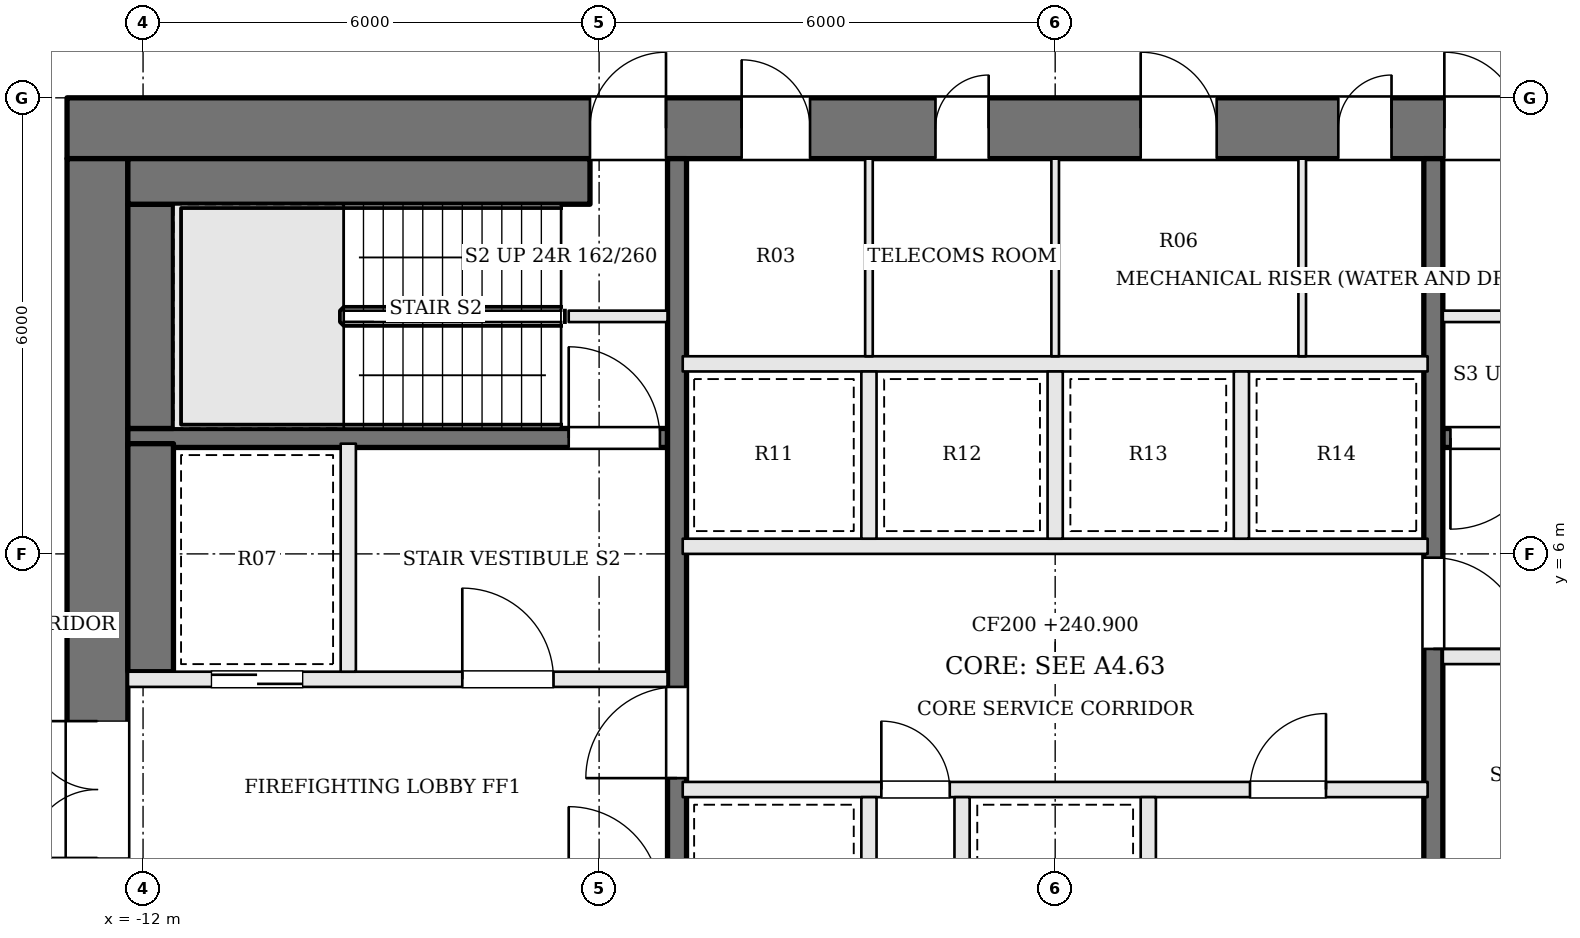
"""IFC4 building model, lengths in metres.
Left out: names, types, materials, properties, quantities, classifications, styles, units other than length and angle.
Written with IfcOpenShell. Run it as: python <this file> out.ifc"""

import sys

from ifc_helpers import new_model, si_unit, direction, frame, frame_2d, origin, place, context, subcontext, project, spatial, rectangle, extrude, element, fill, save


model = new_model("IFC4")
c1 = context("Model", 3, precision=1e-05, world=origin(), true_north=direction((0.0, 1.0)))
c2 = subcontext(c1, "Body", "Model", "MODEL_VIEW")
j1 = project(units=[si_unit("LENGTHUNIT", "METRE"), si_unit("PLANEANGLEUNIT", "RADIAN")], contexts=[c1])
p1 = place(None, origin())
s1 = spatial("IfcSite", under=j1, at=p1, CompositionType="ELEMENT")
p2 = place(p1, origin())
s2 = spatial("IfcBuilding", under=s1, at=p2, CompositionType="ELEMENT")
p3 = place(p2, frame((0.0, 0.0, 240.9)))
s3 = spatial("IfcBuildingStorey", under=s2, at=p3, CompositionType="ELEMENT", Elevation=240.9)
p4 = place(p3, frame((-13.0, 11.6, 0.0), z_axis=(0.0, 0.0, 1.0), x_axis=(1.0, 0.0, 0.0)))
e1 = element("IfcWall", 1, at=p4, inside=s3, PredefinedType="SHEAR", context=c2, shape_type="SweptSolid", body=[
    extrude(rectangle(XDim=26.0, YDim=0.8, at=frame_2d((13.0, 0.0))), origin(), (0.0, 0.0, 1.0), 3.9),
])
p5 = place(p4, frame((8.875, 0.0, 0.0)))
e2 = element("IfcOpeningElement", 2, at=p5, cuts=e1, PredefinedType="OPENING", context=c2, shape_type="SweptSolid", body=[
    extrude(rectangle(XDim=0.9, YDim=2.1, at=frame_2d((0.45, 1.05))), frame((0.0, 0.41, 0.0), z_axis=(0.0, -1.0, 0.0), x_axis=(1.0, 0.0, 0.0)), (0.0, 0.0, 1.0), 0.82),
])
p6 = place(p4, frame((11.425, 0.0, 0.0)))
e3 = element("IfcOpeningElement", 3, at=p6, cuts=e1, PredefinedType="OPENING", context=c2, shape_type="SweptSolid", body=[
    extrude(rectangle(XDim=0.7, YDim=2.1, at=frame_2d((0.35, 1.05))), frame((0.0, 0.41, 0.0), z_axis=(0.0, -1.0, 0.0), x_axis=(1.0, 0.0, 0.0)), (0.0, 0.0, 1.0), 0.82),
])
p7 = place(p4, frame((14.125, 0.0, 0.0)))
e4 = element("IfcOpeningElement", 4, at=p7, cuts=e1, PredefinedType="OPENING", context=c2, shape_type="SweptSolid", body=[
    extrude(rectangle(XDim=1.0, YDim=2.1, at=frame_2d((0.5, 1.05))), frame((0.0, 0.41, 0.0), z_axis=(0.0, -1.0, 0.0), x_axis=(1.0, 0.0, 0.0)), (0.0, 0.0, 1.0), 0.82),
])
p8 = place(p4, frame((16.725, 0.0, 0.0)))
e5 = element("IfcOpeningElement", 5, at=p8, cuts=e1, PredefinedType="OPENING", context=c2, shape_type="SweptSolid", body=[
    extrude(rectangle(XDim=0.7, YDim=2.1, at=frame_2d((0.35, 1.05))), frame((0.0, 0.41, 0.0), z_axis=(0.0, -1.0, 0.0), x_axis=(1.0, 0.0, 0.0)), (0.0, 0.0, 1.0), 0.82),
])
p9 = place(p4, frame((6.88, 0.0, 0.0)))
e6 = element("IfcOpeningElement", 6, at=p9, cuts=e1, PredefinedType="OPENING", context=c2, shape_type="SweptSolid", body=[
    extrude(rectangle(XDim=1.0, YDim=2.1, at=frame_2d((0.5, 1.05))), frame((0.0, 0.41, 0.0), z_axis=(0.0, -1.0, 0.0), x_axis=(1.0, 0.0, 0.0)), (0.0, 0.0, 1.0), 0.82),
])
p10 = place(p4, frame((18.12, 0.0, 0.0)))
e7 = element("IfcOpeningElement", 7, at=p10, cuts=e1, PredefinedType="OPENING", context=c2, shape_type="SweptSolid", body=[
    extrude(rectangle(XDim=1.0, YDim=2.1, at=frame_2d((0.5, 1.05))), frame((0.0, 0.41, 0.0), z_axis=(0.0, -1.0, 0.0), x_axis=(1.0, 0.0, 0.0)), (0.0, 0.0, 1.0), 0.82),
])
p11 = place(p3, frame((-12.6, -2.2, 0.0), z_axis=(0.0, 0.0, 1.0), x_axis=(0.0, 1.0, 0.0)))
e8 = element("IfcWall", 8, at=p11, inside=s3, PredefinedType="SHEAR", context=c2, shape_type="SweptSolid", body=[
    extrude(rectangle(XDim=13.4, YDim=0.8, at=frame_2d((6.7, 0.0))), origin(), (0.0, 0.0, 1.0), 3.9),
])
p12 = place(p11, frame((4.2, 0.0, 0.0)))
e9 = element("IfcOpeningElement", 9, at=p12, cuts=e8, PredefinedType="OPENING", context=c2, shape_type="SweptSolid", body=[
    extrude(rectangle(XDim=1.8, YDim=2.1, at=frame_2d((0.9, 1.05))), frame((0.0, 0.41, 0.0), z_axis=(0.0, -1.0, 0.0), x_axis=(1.0, 0.0, 0.0)), (0.0, 0.0, 1.0), 0.82),
])
for number, where, z_axis, x_axis in (
    (10, (6.4, 9.125, 0.0), (0.0, 0.0, 1.0), (-1.0, 0.0, 0.0)),
    (11, (-6.4, 9.125, 0.0), (0.0, 0.0, 1.0), (1.0, 0.0, 0.0)),
):
    element("IfcWall", number, at=place(p3, frame(where, z_axis=z_axis, x_axis=x_axis)), inside=s3, PredefinedType="SOLIDWALL", context=c2, shape_type="SweptSolid", body=[
        extrude(rectangle(XDim=1.3, YDim=0.15, at=frame_2d((0.65, 0.0))), origin(), (0.0, 0.0, 1.0), 3.7),
    ])
p13 = place(p3, frame((12.2, 7.525, 0.0), z_axis=(0.0, 0.0, 1.0), x_axis=(-1.0, 0.0, 0.0)))
e12 = element("IfcWall", 12, at=p13, inside=s3, PredefinedType="SOLIDWALL", context=c2, shape_type="SweptSolid", body=[
    extrude(rectangle(XDim=7.1, YDim=0.25, at=frame_2d((3.55, 0.0))), origin(), (0.0, 0.0, 1.0), 3.7),
])
p14 = place(p13, frame((5.8, 0.0, 0.0)))
e13 = element("IfcOpeningElement", 13, at=p14, cuts=e12, PredefinedType="OPENING", context=c2, shape_type="SweptSolid", body=[
    extrude(rectangle(XDim=1.2, YDim=2.1, at=frame_2d((0.6, 1.05))), frame((0.0, 0.135, 0.0), z_axis=(0.0, -1.0, 0.0), x_axis=(1.0, 0.0, 0.0)), (0.0, 0.0, 1.0), 0.27),
])
p15 = place(p3, frame((-12.2, 4.35, 0.0), z_axis=(0.0, 0.0, 1.0), x_axis=(1.0, 0.0, 0.0)))
e14 = element("IfcWall", 14, at=p15, inside=s3, PredefinedType="SOLIDWALL", context=c2, shape_type="SweptSolid", body=[
    extrude(rectangle(XDim=7.1, YDim=0.2, at=frame_2d((3.55, 0.0))), origin(), (0.0, 0.0, 1.0), 3.7),
])
p16 = place(p15, frame((4.4, 0.0, 0.0)))
e15 = element("IfcOpeningElement", 15, at=p16, cuts=e14, PredefinedType="OPENING", context=c2, shape_type="SweptSolid", body=[
    extrude(rectangle(XDim=1.2, YDim=2.1, at=frame_2d((0.6, 1.05))), frame((0.0, 0.11, 0.0), z_axis=(0.0, -1.0, 0.0), x_axis=(1.0, 0.0, 0.0)), (0.0, 0.0, 1.0), 0.22),
])
p17 = place(p15, frame((1.1, 0.0, 0.0)))
e16 = element("IfcOpeningElement", 16, at=p17, cuts=e14, PredefinedType="OPENING", context=c2, shape_type="SweptSolid", body=[
    extrude(rectangle(XDim=1.2, YDim=2.1, at=frame_2d((0.6, 1.05))), frame((0.0, 0.11, 0.0), z_axis=(0.0, -1.0, 0.0), x_axis=(1.0, 0.0, 0.0)), (0.0, 0.0, 1.0), 0.22),
])
p18 = place(p3, frame((12.2, 4.65, 0.0), z_axis=(0.0, 0.0, 1.0), x_axis=(-1.0, 0.0, 0.0)))
e17 = element("IfcWall", 17, at=p18, inside=s3, PredefinedType="SOLIDWALL", context=c2, shape_type="SweptSolid", body=[
    extrude(rectangle(XDim=7.1, YDim=0.2, at=frame_2d((3.55, 0.0))), origin(), (0.0, 0.0, 1.0), 3.7),
])
p19 = place(p18, frame((4.4, 0.0, 0.0)))
e18 = element("IfcOpeningElement", 18, at=p19, cuts=e17, PredefinedType="OPENING", context=c2, shape_type="SweptSolid", body=[
    extrude(rectangle(XDim=1.2, YDim=2.1, at=frame_2d((0.6, 1.05))), frame((0.0, 0.11, 0.0), z_axis=(0.0, -1.0, 0.0), x_axis=(1.0, 0.0, 0.0)), (0.0, 0.0, 1.0), 0.22),
])
p20 = place(p18, frame((1.1, 0.0, 0.0)))
e19 = element("IfcOpeningElement", 19, at=p20, cuts=e17, PredefinedType="OPENING", context=c2, shape_type="SweptSolid", body=[
    extrude(rectangle(XDim=1.2, YDim=2.1, at=frame_2d((0.6, 1.05))), frame((0.0, 0.11, 0.0), z_axis=(0.0, -1.0, 0.0), x_axis=(1.0, 0.0, 0.0)), (0.0, 0.0, 1.0), 0.22),
])
p21 = place(p3, frame((-12.2, 7.525, 0.0), z_axis=(0.0, 0.0, 1.0), x_axis=(1.0, 0.0, 0.0)))
e20 = element("IfcWall", 20, at=p21, inside=s3, PredefinedType="SOLIDWALL", context=c2, shape_type="SweptSolid", body=[
    extrude(rectangle(XDim=7.1, YDim=0.25, at=frame_2d((3.55, 0.0))), origin(), (0.0, 0.0, 1.0), 3.7),
])
p22 = place(p21, frame((5.8, 0.0, 0.0)))
e21 = element("IfcOpeningElement", 21, at=p22, cuts=e20, PredefinedType="OPENING", context=c2, shape_type="SweptSolid", body=[
    extrude(rectangle(XDim=1.2, YDim=2.1, at=frame_2d((0.6, 1.05))), frame((0.0, 0.135, 0.0), z_axis=(0.0, -1.0, 0.0), x_axis=(1.0, 0.0, 0.0)), (0.0, 0.0, 1.0), 0.27),
])
p23 = place(p3, frame((-9.3, 4.45, 0.0), z_axis=(0.0, 0.0, 1.0), x_axis=(0.0, 1.0, 0.0)))
e22 = element("IfcWall", 22, at=p23, inside=s3, PredefinedType="SOLIDWALL", context=c2, shape_type="SweptSolid", body=[
    extrude(rectangle(XDim=3.0, YDim=0.2, at=frame_2d((1.5, 0.0))), origin(), (0.0, 0.0, 1.0), 3.7),
])
p24 = place(p3, frame((-4.975, -2.2, 0.0), z_axis=(0.0, 0.0, 1.0), x_axis=(0.0, 1.0, 0.0)))
e23 = element("IfcWall", 23, at=p24, inside=s3, PredefinedType="SOLIDWALL", context=c2, shape_type="SweptSolid", body=[
    extrude(rectangle(XDim=13.4, YDim=0.25, at=frame_2d((6.7, 0.0))), origin(), (0.0, 0.0, 1.0), 3.7),
])
p25 = place(p24, frame((5.25, 0.0, 0.0)))
e24 = element("IfcOpeningElement", 24, at=p25, cuts=e23, PredefinedType="OPENING", context=c2, shape_type="SweptSolid", body=[
    extrude(rectangle(XDim=1.2, YDim=2.1, at=frame_2d((0.6, 1.05))), frame((0.0, 0.135, 0.0), z_axis=(0.0, -1.0, 0.0), x_axis=(1.0, 0.0, 0.0)), (0.0, 0.0, 1.0), 0.27),
])
p26 = place(p3, frame((4.975, 11.2, 0.0), z_axis=(0.0, 0.0, 1.0), x_axis=(0.0, -1.0, 0.0)))
e25 = element("IfcWall", 25, at=p26, inside=s3, PredefinedType="SOLIDWALL", context=c2, shape_type="SweptSolid", body=[
    extrude(rectangle(XDim=13.4, YDim=0.25, at=frame_2d((6.7, 0.0))), origin(), (0.0, 0.0, 1.0), 3.7),
])
p27 = place(p26, frame((5.25, 0.0, 0.0)))
e26 = element("IfcOpeningElement", 26, at=p27, cuts=e25, PredefinedType="OPENING", context=c2, shape_type="SweptSolid", body=[
    extrude(rectangle(XDim=1.2, YDim=2.1, at=frame_2d((0.6, 1.05))), frame((0.0, 0.135, 0.0), z_axis=(0.0, -1.0, 0.0), x_axis=(1.0, 0.0, 0.0)), (0.0, 0.0, 1.0), 0.27),
])
p28 = place(p3, frame((-11.9, 4.45, 0.0), z_axis=(0.0, 0.0, 1.0), x_axis=(0.0, 1.0, 0.0)))
e27 = element("IfcWall", 27, at=p28, inside=s3, PredefinedType="SOLIDWALL", context=c2, shape_type="SweptSolid", body=[
    extrude(rectangle(XDim=3.0, YDim=0.6, at=frame_2d((1.5, 0.0))), origin(), (0.0, 0.0, 1.0), 3.7),
])
p29 = place(p3, frame((-11.9, 7.65, 0.0), z_axis=(0.0, 0.0, 1.0), x_axis=(0.0, 1.0, 0.0)))
e28 = element("IfcWall", 28, at=p29, inside=s3, PredefinedType="SOLIDWALL", context=c2, shape_type="SweptSolid", body=[
    extrude(rectangle(XDim=2.95, YDim=0.6, at=frame_2d((1.475, 0.0))), origin(), (0.0, 0.0, 1.0), 3.7),
])
p30 = place(p3, frame((-12.2, 10.9, 0.0), z_axis=(0.0, 0.0, 1.0), x_axis=(1.0, 0.0, 0.0)))
e29 = element("IfcWall", 29, at=p30, inside=s3, PredefinedType="SOLIDWALL", context=c2, shape_type="SweptSolid", body=[
    extrude(rectangle(XDim=6.08, YDim=0.6, at=frame_2d((3.04, 0.0))), origin(), (0.0, 0.0, 1.0), 3.7),
])
p31 = place(p3, frame((-4.9, 2.9, 0.0), z_axis=(0.0, 0.0, 1.0), x_axis=(1.0, 0.0, 0.0)))
e30 = element("IfcWall", 30, at=p31, inside=s3, PredefinedType="SOLIDWALL", context=c2, shape_type="SweptSolid", body=[
    extrude(rectangle(XDim=9.8, YDim=0.2, at=frame_2d((4.9, 0.0))), origin(), (0.0, 0.0, 1.0), 3.7),
])
p32 = place(p31, frame((2.613, 0.0, 0.0)))
e31 = element("IfcOpeningElement", 31, at=p32, cuts=e30, PredefinedType="OPENING", context=c2, shape_type="SweptSolid", body=[
    extrude(rectangle(XDim=0.9, YDim=2.1, at=frame_2d((0.45, 1.05))), frame((0.0, 0.11, 0.0), z_axis=(0.0, -1.0, 0.0), x_axis=(1.0, 0.0, 0.0)), (0.0, 0.0, 1.0), 0.22),
])
p33 = place(p31, frame((7.463, 0.0, 0.0)))
e32 = element("IfcOpeningElement", 32, at=p33, cuts=e30, PredefinedType="OPENING", context=c2, shape_type="SweptSolid", body=[
    extrude(rectangle(XDim=1.0, YDim=2.1, at=frame_2d((0.5, 1.05))), frame((0.0, 0.11, 0.0), z_axis=(0.0, -1.0, 0.0), x_axis=(1.0, 0.0, 0.0)), (0.0, 0.0, 1.0), 0.22),
])
for number, where, z_axis, x_axis in (
    (33, (-4.9, 6.1, 0.0), (0.0, 0.0, 1.0), (1.0, 0.0, 0.0)),
    (34, (-4.9, 8.5, 0.0), (0.0, 0.0, 1.0), (1.0, 0.0, 0.0)),
):
    element("IfcWall", number, at=place(p3, frame(where, z_axis=z_axis, x_axis=x_axis)), inside=s3, PredefinedType="SOLIDWALL", context=c2, shape_type="SweptSolid", body=[
        extrude(rectangle(XDim=9.8, YDim=0.2, at=frame_2d((4.9, 0.0))), origin(), (0.0, 0.0, 1.0), 3.7),
    ])
for number, where, z_axis, x_axis in (
    (35, (-2.45, 0.6, 0.0), (0.0, 0.0, 1.0), (0.0, 1.0, 0.0)),
    (36, (-1.225, 0.6, 0.0), (0.0, 0.0, 1.0), (0.0, 1.0, 0.0)),
    (37, (1.225, 0.6, 0.0), (0.0, 0.0, 1.0), (0.0, 1.0, 0.0)),
    (38, (-2.45, 6.2, 0.0), (0.0, 0.0, 1.0), (0.0, 1.0, 0.0)),
    (39, (0.0, 6.2, 0.0), (0.0, 0.0, 1.0), (0.0, 1.0, 0.0)),
    (40, (2.45, 6.2, 0.0), (0.0, 0.0, 1.0), (0.0, 1.0, 0.0)),
):
    element("IfcWall", number, at=place(p3, frame(where, z_axis=z_axis, x_axis=x_axis)), inside=s3, PredefinedType="SOLIDWALL", context=c2, shape_type="SweptSolid", body=[
        extrude(rectangle(XDim=2.2, YDim=0.2, at=frame_2d((1.1, 0.0))), origin(), (0.0, 0.0, 1.0), 3.7),
    ])
for number, where, z_axis, x_axis in (
    (41, (-2.45, 8.6, 0.0), (0.0, 0.0, 1.0), (0.0, 1.0, 0.0)),
    (42, (0.0, 8.6, 0.0), (0.0, 0.0, 1.0), (0.0, 1.0, 0.0)),
    (43, (3.25, 8.6, 0.0), (0.0, 0.0, 1.0), (0.0, 1.0, 0.0)),
):
    element("IfcWall", number, at=place(p3, frame(where, z_axis=z_axis, x_axis=x_axis)), inside=s3, PredefinedType="PARTITIONING", context=c2, shape_type="SweptSolid", body=[
        extrude(rectangle(XDim=2.6, YDim=0.1, at=frame_2d((1.3, 0.0))), origin(), (0.0, 0.0, 1.0), 3.7),
    ])
p34 = place(p12, origin())
e44 = element("IfcDoor", 44, at=p34, inside=s3, OperationType="DOUBLE_DOOR_SINGLE_SWING", PredefinedType="DOOR", context=c2, shape_type="SweptSolid", body=[
    extrude(rectangle(XDim=1.8, YDim=2.1, at=frame_2d((0.9, 1.05))), frame((0.0, 0.025, 0.0), z_axis=(0.0, -1.0, 0.0), x_axis=(1.0, 0.0, 0.0)), (0.0, 0.0, 1.0), 0.05),
])
fill(e9, e44)
p35 = place(p25, origin())
e45 = element("IfcDoor", 45, at=p35, inside=s3, OperationType="SINGLE_SWING_LEFT", PredefinedType="DOOR", context=c2, shape_type="SweptSolid", body=[
    extrude(rectangle(XDim=1.2, YDim=2.1, at=frame_2d((0.6, 1.05))), frame((0.0, 0.025, 0.0), z_axis=(0.0, -1.0, 0.0), x_axis=(1.0, 0.0, 0.0)), (0.0, 0.0, 1.0), 0.05),
])
fill(e24, e45)
p36 = place(p27, origin())
e46 = element("IfcDoor", 46, at=p36, inside=s3, OperationType="SINGLE_SWING_RIGHT", PredefinedType="DOOR", context=c2, shape_type="SweptSolid", body=[
    extrude(rectangle(XDim=1.2, YDim=2.1, at=frame_2d((0.6, 1.05))), frame((0.0, 0.025, 0.0), z_axis=(0.0, -1.0, 0.0), x_axis=(1.0, 0.0, 0.0)), (0.0, 0.0, 1.0), 0.05),
])
fill(e26, e46)
p37 = place(p16, origin())
e47 = element("IfcDoor", 47, at=p37, inside=s3, OperationType="SINGLE_SWING_LEFT", PredefinedType="DOOR", context=c2, shape_type="SweptSolid", body=[
    extrude(rectangle(XDim=1.2, YDim=2.1, at=frame_2d((0.6, 1.05))), frame((0.0, 0.025, 0.0), z_axis=(0.0, -1.0, 0.0), x_axis=(1.0, 0.0, 0.0)), (0.0, 0.0, 1.0), 0.05),
])
fill(e15, e47)
p38 = place(p14, origin())
e48 = element("IfcDoor", 48, at=p38, inside=s3, OperationType="SINGLE_SWING_RIGHT", PredefinedType="DOOR", context=c2, shape_type="SweptSolid", body=[
    extrude(rectangle(XDim=1.2, YDim=2.1, at=frame_2d((0.6, 1.05))), frame((0.0, 0.025, 0.0), z_axis=(0.0, -1.0, 0.0), x_axis=(1.0, 0.0, 0.0)), (0.0, 0.0, 1.0), 0.05),
])
fill(e13, e48)
p39 = place(p22, origin())
e49 = element("IfcDoor", 49, at=p39, inside=s3, OperationType="SINGLE_SWING_LEFT", PredefinedType="DOOR", context=c2, shape_type="SweptSolid", body=[
    extrude(rectangle(XDim=1.2, YDim=2.1, at=frame_2d((0.6, 1.05))), frame((0.0, 0.025, 0.0), z_axis=(0.0, -1.0, 0.0), x_axis=(1.0, 0.0, 0.0)), (0.0, 0.0, 1.0), 0.05),
])
fill(e21, e49)
p40 = place(p17, origin())
e50 = element("IfcDoor", 50, at=p40, inside=s3, OperationType="SLIDING_TO_RIGHT", PredefinedType="DOOR", context=c2, shape_type="SweptSolid", body=[
    extrude(rectangle(XDim=1.2, YDim=2.1, at=frame_2d((0.6, 1.05))), frame((0.0, 0.025, 0.0), z_axis=(0.0, -1.0, 0.0), x_axis=(1.0, 0.0, 0.0)), (0.0, 0.0, 1.0), 0.05),
])
fill(e16, e50)
p41 = place(p32, origin())
e51 = element("IfcDoor", 51, at=p41, inside=s3, OperationType="SINGLE_SWING_LEFT", PredefinedType="DOOR", context=c2, shape_type="SweptSolid", body=[
    extrude(rectangle(XDim=0.9, YDim=2.1, at=frame_2d((0.45, 1.05))), frame((0.0, 0.025, 0.0), z_axis=(0.0, -1.0, 0.0), x_axis=(1.0, 0.0, 0.0)), (0.0, 0.0, 1.0), 0.05),
])
fill(e31, e51)
p42 = place(p33, origin())
e52 = element("IfcDoor", 52, at=p42, inside=s3, OperationType="SINGLE_SWING_RIGHT", PredefinedType="DOOR", context=c2, shape_type="SweptSolid", body=[
    extrude(rectangle(XDim=1.0, YDim=2.1, at=frame_2d((0.5, 1.05))), frame((0.0, 0.025, 0.0), z_axis=(0.0, -1.0, 0.0), x_axis=(1.0, 0.0, 0.0)), (0.0, 0.0, 1.0), 0.05),
])
fill(e32, e52)
p43 = place(p5, origin())
e53 = element("IfcDoor", 53, at=p43, inside=s3, OperationType="SINGLE_SWING_LEFT", PredefinedType="DOOR", context=c2, shape_type="SweptSolid", body=[
    extrude(rectangle(XDim=0.9, YDim=2.1, at=frame_2d((0.45, 1.05))), frame((0.0, 0.025, 0.0), z_axis=(0.0, -1.0, 0.0), x_axis=(1.0, 0.0, 0.0)), (0.0, 0.0, 1.0), 0.05),
])
fill(e2, e53)
p44 = place(p6, origin())
e54 = element("IfcDoor", 54, at=p44, inside=s3, OperationType="SINGLE_SWING_RIGHT", PredefinedType="DOOR", context=c2, shape_type="SweptSolid", body=[
    extrude(rectangle(XDim=0.7, YDim=2.1, at=frame_2d((0.35, 1.05))), frame((0.0, 0.025, 0.0), z_axis=(0.0, -1.0, 0.0), x_axis=(1.0, 0.0, 0.0)), (0.0, 0.0, 1.0), 0.05),
])
fill(e3, e54)
p45 = place(p7, origin())
e55 = element("IfcDoor", 55, at=p45, inside=s3, OperationType="SINGLE_SWING_LEFT", PredefinedType="DOOR", context=c2, shape_type="SweptSolid", body=[
    extrude(rectangle(XDim=1.0, YDim=2.1, at=frame_2d((0.5, 1.05))), frame((0.0, 0.025, 0.0), z_axis=(0.0, -1.0, 0.0), x_axis=(1.0, 0.0, 0.0)), (0.0, 0.0, 1.0), 0.05),
])
fill(e4, e55)
p46 = place(p8, origin())
e56 = element("IfcDoor", 56, at=p46, inside=s3, OperationType="SINGLE_SWING_RIGHT", PredefinedType="DOOR", context=c2, shape_type="SweptSolid", body=[
    extrude(rectangle(XDim=0.7, YDim=2.1, at=frame_2d((0.35, 1.05))), frame((0.0, 0.025, 0.0), z_axis=(0.0, -1.0, 0.0), x_axis=(1.0, 0.0, 0.0)), (0.0, 0.0, 1.0), 0.05),
])
fill(e5, e56)
p47 = place(p9, origin())
e57 = element("IfcDoor", 57, at=p47, inside=s3, OperationType="SINGLE_SWING_RIGHT", PredefinedType="DOOR", context=c2, shape_type="SweptSolid", body=[
    extrude(rectangle(XDim=1.0, YDim=2.1, at=frame_2d((0.5, 1.05))), frame((0.0, 0.025, 0.0), z_axis=(0.0, -1.0, 0.0), x_axis=(1.0, 0.0, 0.0)), (0.0, 0.0, 1.0), 0.05),
])
fill(e6, e57)
p48 = place(p10, origin())
e58 = element("IfcDoor", 58, at=p48, inside=s3, OperationType="SINGLE_SWING_LEFT", PredefinedType="DOOR", context=c2, shape_type="SweptSolid", body=[
    extrude(rectangle(XDim=1.0, YDim=2.1, at=frame_2d((0.5, 1.05))), frame((0.0, 0.025, 0.0), z_axis=(0.0, -1.0, 0.0), x_axis=(1.0, 0.0, 0.0)), (0.0, 0.0, 1.0), 0.05),
])
fill(e7, e58)
save(model, sys.argv[1])
